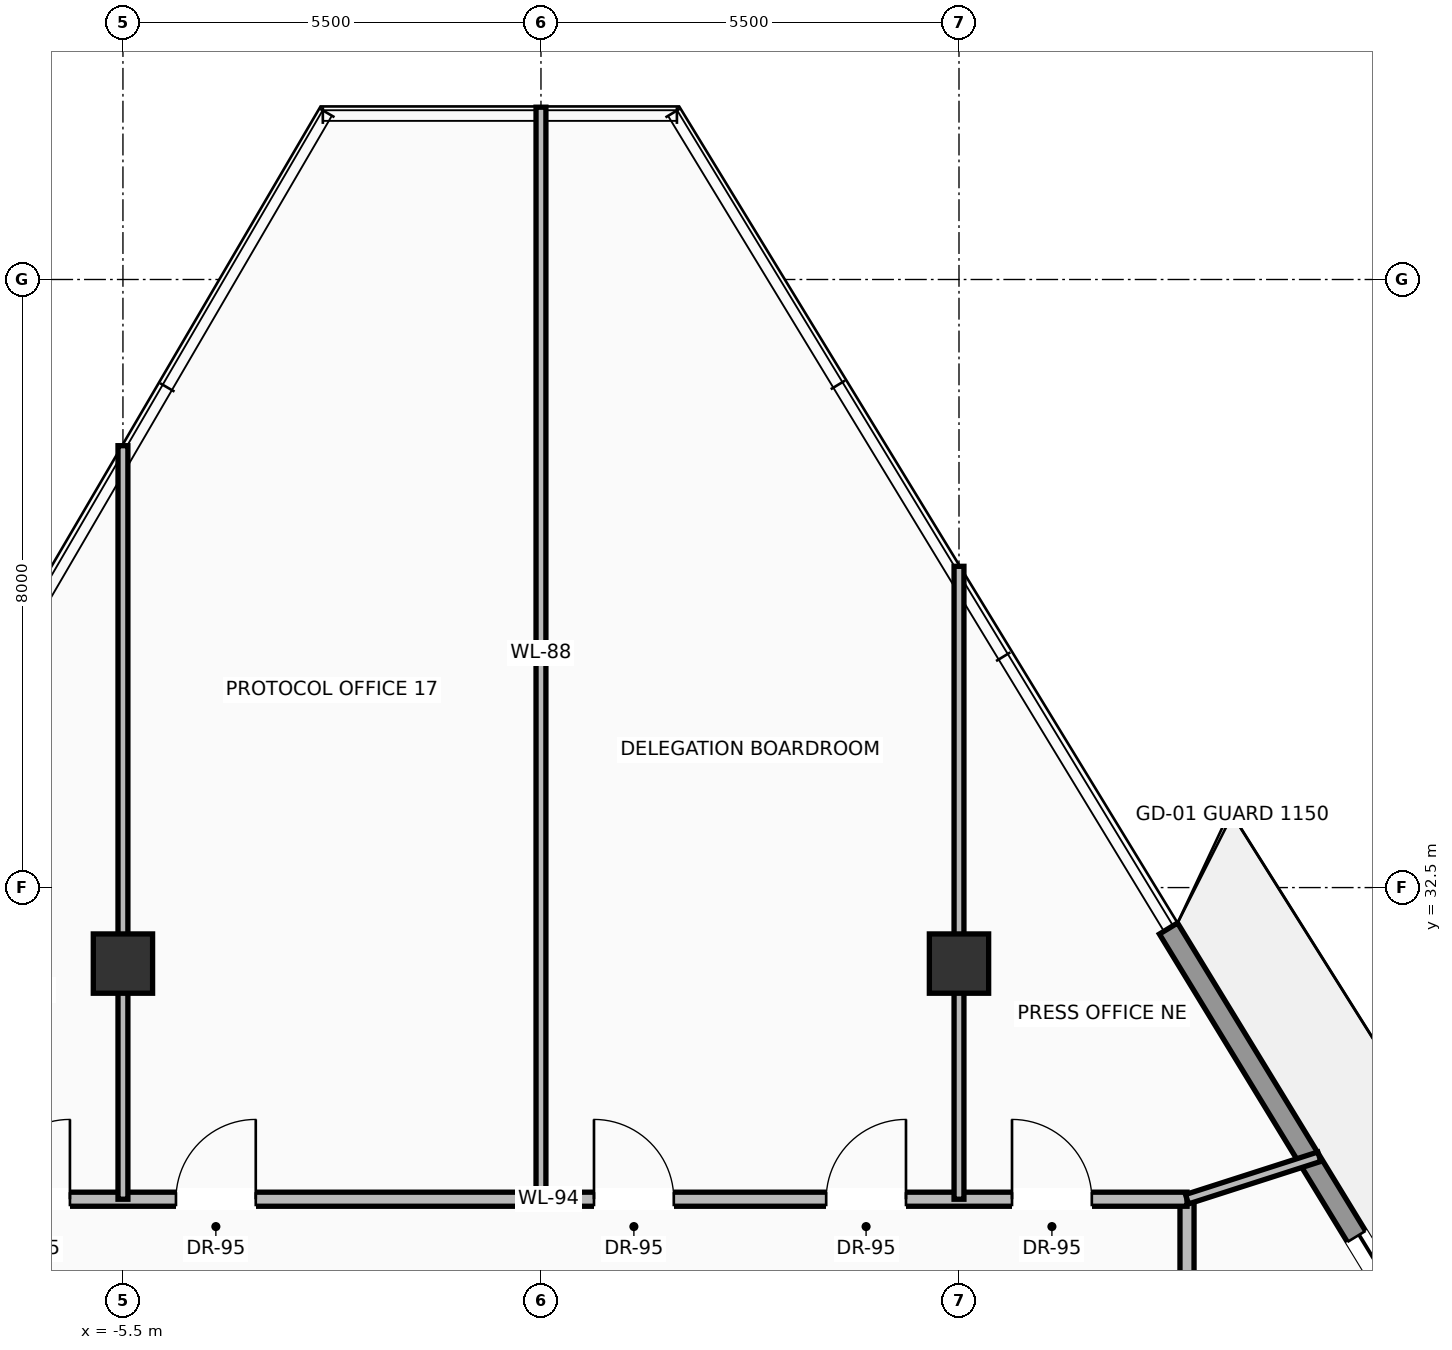
"""IFC4 building model, lengths in metres.
Left out: names, types, materials, properties, quantities, classifications, styles, units other than length and angle.
Written with IfcOpenShell. Run it as: python <this file> out.ifc"""

import sys

from ifc_helpers import new_model, si_unit, direction, frame, frame_2d, origin, origin_2d, place, context, subcontext, project, spatial, rectangle, extrude, source, transform, mapped, element, fill, save


model = new_model("IFC4")
c1 = context("Model", 3, precision=1e-05, world=origin(), true_north=direction((0.0, 1.0)))
c2 = subcontext(c1, "Body", "Model", "MODEL_VIEW")
j1 = project(units=[si_unit("LENGTHUNIT", "METRE"), si_unit("PLANEANGLEUNIT", "RADIAN")], contexts=[c1])
p1 = place(None, origin())
s1 = spatial("IfcSite", under=j1, at=p1, CompositionType="ELEMENT")
p2 = place(p1, origin())
s2 = spatial("IfcBuilding", under=s1, at=p2, CompositionType="ELEMENT")
p3 = place(p2, frame((0.0, 0.0, 251.05)))
s3 = spatial("IfcBuildingStorey", under=s2, at=p3, CompositionType="ELEMENT", Elevation=251.05)
m1 = source(origin(), c2, "Body", "SweptSolid", [
    extrude(rectangle(XDim=0.78, YDim=0.78, at=origin_2d()), origin(), (0.0, 0.0, 1.0), 3.45),
])
for number, where, z_axis, x_axis in (
    (1, (-5.5, 31.5, 0.0), (0.0, 0.0, 1.0), (1.0, 0.0, 0.0)),
    (2, (5.5, 31.5, 0.0), (0.0, 0.0, 1.0), (1.0, 0.0, 0.0)),
):
    element("IfcColumn", number, at=place(p3, frame(where, z_axis=z_axis, x_axis=x_axis)), inside=s3, PredefinedType="COLUMN", context=c2, shape_type="MappedRepresentation", body=[
        mapped(m1, transform((0.0, 0.0, 0.0), scale=1.0)),
    ])
p4 = place(p3, frame((8.256, 31.961, 0.0), z_axis=(0.0, 0.0, 1.0), x_axis=(0.521016032817, -0.853546890069, 0.0)))
e3 = element("IfcWall", 3, at=p4, inside=s3, PredefinedType="SOLIDWALL", context=c2, shape_type="SweptSolid", body=[
    extrude(rectangle(XDim=19.778, YDim=0.28, at=frame_2d((9.889, 0.0))), origin(), (0.0, 0.0, 1.0), 2.82),
])
p5 = place(p4, frame((4.747, 0.0, 0.0)))
e4 = element("IfcOpeningElement", 4, at=p5, cuts=e3, PredefinedType="OPENING", context=c2, shape_type="SweptSolid", body=[
    extrude(rectangle(XDim=1.6, YDim=2.35, at=frame_2d((0.8, 1.175))), frame((0.0, 0.15, 0.0), z_axis=(0.0, -1.0, 0.0), x_axis=(1.0, 0.0, 0.0)), (0.0, 0.0, 1.0), 0.3),
])
p6 = place(p4, frame((13.449, 0.0, 0.9)))
e5 = element("IfcOpeningElement", 5, at=p6, cuts=e3, PredefinedType="OPENING", context=c2, shape_type="SweptSolid", body=[
    extrude(rectangle(XDim=1.55, YDim=1.75, at=frame_2d((0.775, 0.875))), frame((0.0, 0.15, 0.0), z_axis=(0.0, -1.0, 0.0), x_axis=(1.0, 0.0, 0.0)), (0.0, 0.0, 1.0), 0.3),
])
p7 = place(p3, frame((8.5, 16.3, 0.0), z_axis=(0.0, 0.0, 1.0), x_axis=(0.0, 1.0, 0.0)))
e6 = element("IfcWall", 6, at=p7, inside=s3, PredefinedType="PARTITIONING", context=c2, shape_type="SweptSolid", body=[
    extrude(rectangle(XDim=12.1, YDim=0.185, at=frame_2d((6.05, 0.0))), origin(), (0.0, 0.0, 1.0), 3.232),
])
p8 = place(p7, frame((2.882, 0.0, 0.0)))
e7 = element("IfcOpeningElement", 7, at=p8, cuts=e6, PredefinedType="OPENING", context=c2, shape_type="SweptSolid", body=[
    extrude(rectangle(XDim=1.05, YDim=2.25, at=frame_2d((0.525, 1.125))), frame((0.0, 0.103, 0.0), z_axis=(0.0, -1.0, 0.0), x_axis=(1.0, 0.0, 0.0)), (0.0, 0.0, 1.0), 0.205),
])
p9 = place(p7, frame((6.552, 0.0, 0.0)))
e8 = element("IfcOpeningElement", 8, at=p9, cuts=e6, PredefinedType="OPENING", context=c2, shape_type="SweptSolid", body=[
    extrude(rectangle(XDim=1.05, YDim=2.25, at=frame_2d((0.525, 1.125))), frame((0.0, 0.103, 0.0), z_axis=(0.0, -1.0, 0.0), x_axis=(1.0, 0.0, 0.0)), (0.0, 0.0, 1.0), 0.205),
])
p10 = place(p7, frame((9.865, 0.0, 0.0)))
e9 = element("IfcOpeningElement", 9, at=p10, cuts=e6, PredefinedType="OPENING", context=c2, shape_type="SweptSolid", body=[
    extrude(rectangle(XDim=1.05, YDim=2.25, at=frame_2d((0.525, 1.125))), frame((0.0, 0.103, 0.0), z_axis=(0.0, -1.0, 0.0), x_axis=(1.0, 0.0, 0.0)), (0.0, 0.0, 1.0), 0.205),
])
p11 = place(p3, frame((-8.3, 28.4, 0.0), z_axis=(0.0, 0.0, 1.0), x_axis=(1.0, 0.0, 0.0)))
e10 = element("IfcWall", 10, at=p11, inside=s3, PredefinedType="PARTITIONING", context=c2, shape_type="SweptSolid", body=[
    extrude(rectangle(XDim=16.8, YDim=0.185, at=frame_2d((8.4, 0.0))), origin(), (0.0, 0.0, 1.0), 3.232),
])
p12 = place(p11, frame((3.498, 0.0, 0.0)))
e11 = element("IfcOpeningElement", 11, at=p12, cuts=e10, PredefinedType="OPENING", context=c2, shape_type="SweptSolid", body=[
    extrude(rectangle(XDim=1.05, YDim=2.25, at=frame_2d((0.525, 1.125))), frame((0.0, 0.103, 0.0), z_axis=(0.0, -1.0, 0.0), x_axis=(1.0, 0.0, 0.0)), (0.0, 0.0, 1.0), 0.205),
])
p13 = place(p11, frame((8.998, 0.0, 0.0)))
e12 = element("IfcOpeningElement", 12, at=p13, cuts=e10, PredefinedType="OPENING", context=c2, shape_type="SweptSolid", body=[
    extrude(rectangle(XDim=1.05, YDim=2.25, at=frame_2d((0.525, 1.125))), frame((0.0, 0.103, 0.0), z_axis=(0.0, -1.0, 0.0), x_axis=(1.0, 0.0, 0.0)), (0.0, 0.0, 1.0), 0.205),
])
p14 = place(p11, frame((12.052, 0.0, 0.0)))
e13 = element("IfcOpeningElement", 13, at=p14, cuts=e10, PredefinedType="OPENING", context=c2, shape_type="SweptSolid", body=[
    extrude(rectangle(XDim=1.05, YDim=2.25, at=frame_2d((0.525, 1.125))), frame((0.0, 0.103, 0.0), z_axis=(0.0, -1.0, 0.0), x_axis=(1.0, 0.0, 0.0)), (0.0, 0.0, 1.0), 0.205),
])
p15 = place(p11, frame((14.498, 0.0, 0.0)))
e14 = element("IfcOpeningElement", 14, at=p15, cuts=e10, PredefinedType="OPENING", context=c2, shape_type="SweptSolid", body=[
    extrude(rectangle(XDim=1.05, YDim=2.25, at=frame_2d((0.525, 1.125))), frame((0.0, 0.103, 0.0), z_axis=(0.0, -1.0, 0.0), x_axis=(1.0, 0.0, 0.0)), (0.0, 0.0, 1.0), 0.205),
])
p16 = place(p11, frame((1.052, 0.0, 0.0)))
e15 = element("IfcOpeningElement", 15, at=p16, cuts=e10, PredefinedType="OPENING", context=c2, shape_type="SweptSolid", body=[
    extrude(rectangle(XDim=1.05, YDim=2.25, at=frame_2d((0.525, 1.125))), frame((0.0, 0.103, 0.0), z_axis=(0.0, -1.0, 0.0), x_axis=(1.0, 0.0, 0.0)), (0.0, 0.0, 1.0), 0.205),
])
p17 = place(p3, frame((8.5, 28.4, 0.0), z_axis=(0.0, 0.0, 1.0), x_axis=(0.952084104076, 0.305836326758, 0.0)))
e16 = element("IfcWall", 16, at=p17, inside=s3, PredefinedType="PARTITIONING", context=c2, shape_type="SweptSolid", body=[
    extrude(rectangle(XDim=1.829, YDim=0.13, at=frame_2d((0.915, 0.0))), origin(), (0.0, 0.0, 1.0), 3.232),
])
p18 = place(p3, frame((-5.5, 28.4, 0.0), z_axis=(0.0, 0.0, 1.0), x_axis=(0.0, 1.0, 0.0)))
e17 = element("IfcWall", 17, at=p18, inside=s3, PredefinedType="PARTITIONING", context=c2, shape_type="SweptSolid", body=[
    extrude(rectangle(XDim=9.914, YDim=0.13, at=frame_2d((4.957, 0.0))), origin(), (0.0, 0.0, 1.0), 2.683),
])
p19 = place(p3, frame((5.5, 28.4, 0.0), z_axis=(0.0, 0.0, 1.0), x_axis=(0.0, 1.0, 0.0)))
e18 = element("IfcWall", 18, at=p19, inside=s3, PredefinedType="PARTITIONING", context=c2, shape_type="SweptSolid", body=[
    extrude(rectangle(XDim=8.327, YDim=0.13, at=frame_2d((4.163, 0.0))), origin(), (0.0, 0.0, 1.0), 2.683),
])
p20 = place(p3, frame((0.0, 28.4, 0.0), z_axis=(0.0, 0.0, 1.0), x_axis=(0.0, 1.0, 0.0)))
e19 = element("IfcWall", 19, at=p20, inside=s3, PredefinedType="PARTITIONING", context=c2, shape_type="SweptSolid", body=[
    extrude(rectangle(XDim=14.367, YDim=0.13, at=frame_2d((7.184, 0.0))), origin(), (0.0, 0.0, 1.0), 3.232),
])
m2 = source(origin(), c2, "Body", "SweptSolid", [
    extrude(rectangle(XDim=1.6, YDim=2.35, at=frame_2d((0.8, 1.175))), frame((0.0, 0.025, 0.0), z_axis=(0.0, -1.0, 0.0), x_axis=(1.0, 0.0, 0.0)), (0.0, 0.0, 1.0), 0.05),
])
p21 = place(p5, origin())
e20 = element("IfcDoor", 20, at=p21, inside=s3, OperationType="SLIDING_TO_RIGHT", PredefinedType="DOOR", context=c2, shape_type="MappedRepresentation", body=[
    mapped(m2, transform((0.0, 0.0, 0.0), scale=1.0)),
])
fill(e4, e20)
m3 = source(origin(), c2, "Body", "SweptSolid", [
    extrude(rectangle(XDim=1.05, YDim=2.25, at=frame_2d((0.525, 1.125))), frame((0.0, 0.025, 0.0), z_axis=(0.0, -1.0, 0.0), x_axis=(1.0, 0.0, 0.0)), (0.0, 0.0, 1.0), 0.05),
])
p22 = place(p12, origin())
e21 = element("IfcDoor", 21, at=p22, inside=s3, OperationType="SINGLE_SWING_RIGHT", PredefinedType="DOOR", context=c2, shape_type="MappedRepresentation", body=[
    mapped(m3, transform((0.0, 0.0, 0.0), scale=1.0)),
])
fill(e11, e21)
p23 = place(p13, origin())
e22 = element("IfcDoor", 22, at=p23, inside=s3, OperationType="SINGLE_SWING_LEFT", PredefinedType="DOOR", context=c2, shape_type="MappedRepresentation", body=[
    mapped(m3, transform((0.0, 0.0, 0.0), scale=1.0)),
])
fill(e12, e22)
p24 = place(p14, origin())
e23 = element("IfcDoor", 23, at=p24, inside=s3, OperationType="SINGLE_SWING_RIGHT", PredefinedType="DOOR", context=c2, shape_type="MappedRepresentation", body=[
    mapped(m3, transform((0.0, 0.0, 0.0), scale=1.0)),
])
fill(e13, e23)
p25 = place(p15, origin())
e24 = element("IfcDoor", 24, at=p25, inside=s3, OperationType="SINGLE_SWING_LEFT", PredefinedType="DOOR", context=c2, shape_type="MappedRepresentation", body=[
    mapped(m3, transform((0.0, 0.0, 0.0), scale=1.0)),
])
fill(e14, e24)
p26 = place(p16, origin())
e25 = element("IfcDoor", 25, at=p26, inside=s3, OperationType="SINGLE_SWING_RIGHT", PredefinedType="DOOR", context=c2, shape_type="MappedRepresentation", body=[
    mapped(m3, transform((0.0, 0.0, 0.0), scale=1.0)),
])
fill(e15, e25)
save(model, sys.argv[1])
